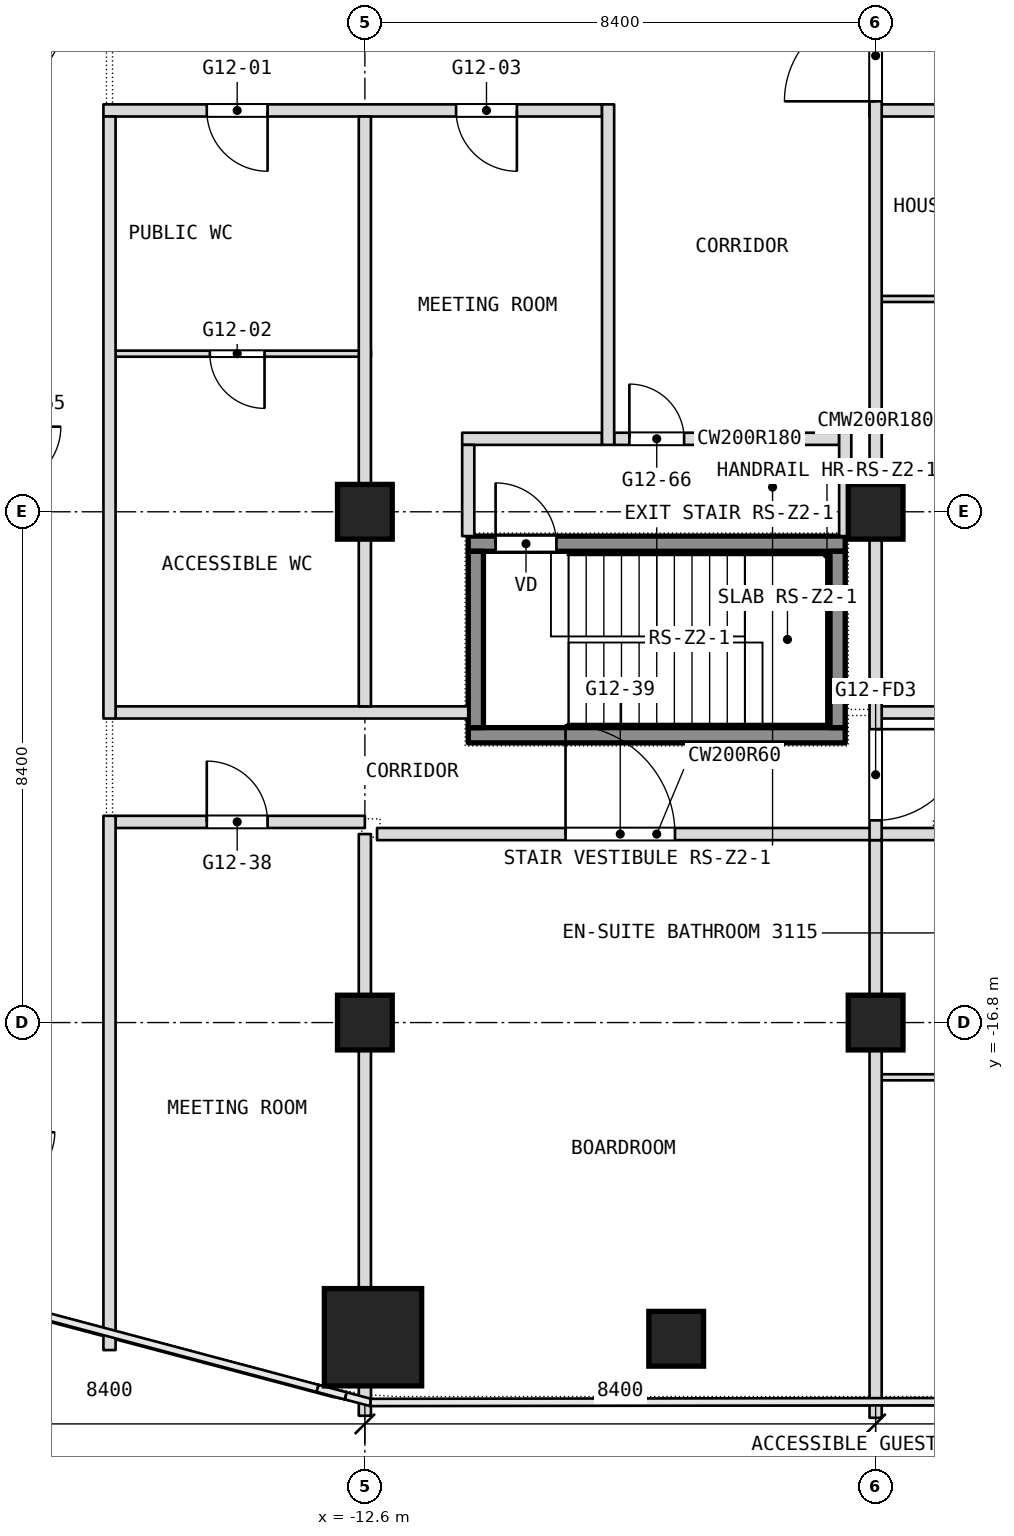
"""IFC4 building model, lengths in metres.
Left out: names, types, materials, properties, quantities, classifications, styles, units other than length and angle.
Written with IfcOpenShell. Run it as: python <this file> out.ifc"""

import sys

from ifc_helpers import new_model, si_unit, direction, frame, frame_2d, origin, origin_2d, place, context, subcontext, project, spatial, rectangle, extrude, element, fill, save


model = new_model("IFC4")
c1 = context("Model", 3, precision=1e-05, world=origin(), true_north=direction((0.0, 1.0)))
c2 = subcontext(c1, "Body", "Model", "MODEL_VIEW")
j1 = project(units=[si_unit("LENGTHUNIT", "METRE"), si_unit("PLANEANGLEUNIT", "RADIAN")], contexts=[c1])
p1 = place(None, origin())
s1 = spatial("IfcSite", under=j1, at=p1, CompositionType="ELEMENT")
p2 = place(p1, origin())
s2 = spatial("IfcBuilding", under=s1, at=p2, CompositionType="ELEMENT")
p3 = place(p2, frame((0.0, 0.0, 137.3)))
s3 = spatial("IfcBuildingStorey", under=s2, at=p3, CompositionType="ELEMENT", Elevation=137.3)
p4 = place(p3, frame((-12.466, -21.975, 0.0), z_axis=(0.0, 0.0, 1.0), x_axis=(1.0, 0.0, 0.0)))
e1 = element("IfcColumn", 1, at=p4, inside=s3, PredefinedType="COLUMN", context=c2, shape_type="SweptSolid", body=[
    extrude(rectangle(XDim=1.6, YDim=1.6, at=origin_2d()), origin(), (0.0, 0.0, 1.0), 3.6),
])
for number, where, z_axis, x_axis in (
    (2, (-12.6, -16.8, 0.0), (0.0, 0.0, 1.0), (1.0, 0.0, 0.0)),
    (3, (-12.6, -8.4, 0.0), (0.0, 0.0, 1.0), (1.0, 0.0, 0.0)),
    (4, (-4.2, -16.8, 0.0), (0.0, 0.0, 1.0), (1.0, 0.0, 0.0)),
    (5, (-4.2, -8.4, 0.0), (0.0, 0.0, 1.0), (1.0, 0.0, 0.0)),
    (6, (-7.48, -22.0, 0.0), (0.0, 0.0, 1.0), (1.0, 0.0, 0.0)),
):
    element("IfcColumn", number, at=place(p3, frame(where, z_axis=z_axis, x_axis=x_axis)), inside=s3, PredefinedType="COLUMN", context=c2, shape_type="SweptSolid", body=[
        extrude(rectangle(XDim=0.9, YDim=0.9, at=origin_2d()), origin(), (0.0, 0.0, 1.0), 3.6),
    ])
p5 = place(p3, frame((-4.1, -17.7, 0.0), z_axis=(0.0, 0.0, 1.0), x_axis=(1.0, 0.0, 0.0)))
e7 = element("IfcWall", 7, at=p5, inside=s3, PredefinedType="PARTITIONING", context=c2, shape_type="SweptSolid", body=[
    extrude(rectangle(XDim=2.35, YDim=0.1, at=frame_2d((1.175, 0.0))), origin(), (0.0, 0.0, 1.0), 3.34),
])
p6 = place(p5, frame((1.3, 0.0, 0.0)))
e8 = element("IfcOpeningElement", 8, at=p6, cuts=e7, PredefinedType="OPENING", context=c2, shape_type="SweptSolid", body=[
    extrude(rectangle(XDim=0.9, YDim=2.1, at=frame_2d((0.45, 1.05))), frame((0.0, 0.05, 0.0), z_axis=(0.0, -1.0, 0.0), x_axis=(1.0, 0.0, 0.0)), (0.0, 0.0, 1.0), 0.1),
])
p7 = place(p3, frame((-12.4, -13.7, 0.0), z_axis=(0.0, 0.0, 1.0), x_axis=(1.0, 0.0, 0.0)))
e9 = element("IfcWall", 9, at=p7, inside=s3, PredefinedType="PARTITIONING", context=c2, shape_type="SweptSolid", body=[
    extrude(rectangle(XDim=9.2, YDim=0.2, at=frame_2d((4.6, 0.0))), origin(), (0.0, 0.0, 1.0), 3.34),
])
p8 = place(p7, frame((3.1, 0.0, 0.0)))
e10 = element("IfcOpeningElement", 10, at=p8, cuts=e9, PredefinedType="OPENING", context=c2, shape_type="SweptSolid", body=[
    extrude(rectangle(XDim=1.8, YDim=2.1, at=frame_2d((0.9, 1.05))), frame((0.0, 0.1, 0.0), z_axis=(0.0, -1.0, 0.0), x_axis=(1.0, 0.0, 0.0)), (0.0, 0.0, 1.0), 0.2),
])
p9 = place(p3, frame((-16.7, -13.5, 0.0), z_axis=(0.0, 0.0, 1.0), x_axis=(1.0, 0.0, 0.0)))
e11 = element("IfcWall", 11, at=p9, inside=s3, PredefinedType="PARTITIONING", context=c2, shape_type="SweptSolid", body=[
    extrude(rectangle(XDim=4.1, YDim=0.2, at=frame_2d((2.05, 0.0))), origin(), (0.0, 0.0, 1.0), 3.34),
])
p10 = place(p9, frame((1.5, 0.0, 0.0)))
e12 = element("IfcOpeningElement", 12, at=p10, cuts=e11, PredefinedType="OPENING", context=c2, shape_type="SweptSolid", body=[
    extrude(rectangle(XDim=1.0, YDim=2.1, at=frame_2d((0.5, 1.05))), frame((0.0, 0.1, 0.0), z_axis=(0.0, -1.0, 0.0), x_axis=(1.0, 0.0, 0.0)), (0.0, 0.0, 1.0), 0.2),
])
p11 = place(p3, frame((-16.7, -11.7, 0.0), z_axis=(0.0, 0.0, 1.0), x_axis=(1.0, 0.0, 0.0)))
e13 = element("IfcWall", 13, at=p11, inside=s3, PredefinedType="PARTITIONING", context=c2, shape_type="SweptSolid", body=[
    extrude(rectangle(XDim=5.8, YDim=0.2, at=frame_2d((2.9, 0.0))), origin(), (0.0, 0.0, 1.0), 3.34),
])
p12 = place(p3, frame((-4.1, -11.7, 0.0), z_axis=(0.0, 0.0, 1.0), x_axis=(1.0, 0.0, 0.0)))
e14 = element("IfcWall", 14, at=p12, inside=s3, PredefinedType="PARTITIONING", context=c2, shape_type="SweptSolid", body=[
    extrude(rectangle(XDim=20.8, YDim=0.2, at=frame_2d((10.4, 0.0))), origin(), (0.0, 0.0, 1.0), 3.34),
])
p13 = place(p12, frame((14.1, 0.0, 0.0)))
e15 = element("IfcOpeningElement", 15, at=p13, cuts=e14, PredefinedType="OPENING", context=c2, shape_type="SweptSolid", body=[
    extrude(rectangle(XDim=1.0, YDim=2.1, at=frame_2d((0.5, 1.05))), frame((0.0, 0.1, 0.0), z_axis=(0.0, -1.0, 0.0), x_axis=(1.0, 0.0, 0.0)), (0.0, 0.0, 1.0), 0.2),
])
p14 = place(p12, frame((5.7, 0.0, 0.0)))
e16 = element("IfcOpeningElement", 16, at=p14, cuts=e14, PredefinedType="OPENING", context=c2, shape_type="SweptSolid", body=[
    extrude(rectangle(XDim=1.0, YDim=2.1, at=frame_2d((0.5, 1.05))), frame((0.0, 0.1, 0.0), z_axis=(0.0, -1.0, 0.0), x_axis=(1.0, 0.0, 0.0)), (0.0, 0.0, 1.0), 0.2),
])
p15 = place(p3, frame((-11.0, -7.2, 0.0), z_axis=(0.0, 0.0, 1.0), x_axis=(1.0, 0.0, 0.0)))
e17 = element("IfcWall", 17, at=p15, inside=s3, PredefinedType="PARTITIONING", context=c2, shape_type="SweptSolid", body=[
    extrude(rectangle(XDim=2.3, YDim=0.2, at=frame_2d((1.15, 0.0))), origin(), (0.0, 0.0, 1.0), 3.34),
])
p16 = place(p3, frame((-8.5, -7.2, 0.0), z_axis=(0.0, 0.0, 1.0), x_axis=(1.0, 0.0, 0.0)))
e18 = element("IfcWall", 18, at=p16, inside=s3, PredefinedType="PARTITIONING", context=c2, shape_type="SweptSolid", body=[
    extrude(rectangle(XDim=3.7, YDim=0.2, at=frame_2d((1.85, 0.0))), origin(), (0.0, 0.0, 1.0), 3.34),
])
p17 = place(p16, frame((0.25, 0.0, 0.0)))
e19 = element("IfcOpeningElement", 19, at=p17, cuts=e18, PredefinedType="OPENING", context=c2, shape_type="SweptSolid", body=[
    extrude(rectangle(XDim=0.9, YDim=2.1, at=frame_2d((0.45, 1.05))), frame((0.0, 0.1, 0.0), z_axis=(0.0, -1.0, 0.0), x_axis=(1.0, 0.0, 0.0)), (0.0, 0.0, 1.0), 0.2),
])
p18 = place(p3, frame((-16.7, -5.8, 0.0), z_axis=(0.0, 0.0, 1.0), x_axis=(1.0, 0.0, 0.0)))
e20 = element("IfcWall", 20, at=p18, inside=s3, PredefinedType="PARTITIONING", context=c2, shape_type="SweptSolid", body=[
    extrude(rectangle(XDim=4.2, YDim=0.1, at=frame_2d((2.1, 0.0))), origin(), (0.0, 0.0, 1.0), 3.34),
])
p19 = place(p18, frame((1.55, 0.0, 0.0)))
e21 = element("IfcOpeningElement", 21, at=p19, cuts=e20, PredefinedType="OPENING", context=c2, shape_type="SweptSolid", body=[
    extrude(rectangle(XDim=0.9, YDim=2.1, at=frame_2d((0.45, 1.05))), frame((0.0, 0.05, 0.0), z_axis=(0.0, -1.0, 0.0), x_axis=(1.0, 0.0, 0.0)), (0.0, 0.0, 1.0), 0.1),
])
p20 = place(p3, frame((-4.1, -4.9, 0.0), z_axis=(0.0, 0.0, 1.0), x_axis=(1.0, 0.0, 0.0)))
e22 = element("IfcWall", 22, at=p20, inside=s3, PredefinedType="PARTITIONING", context=c2, shape_type="SweptSolid", body=[
    extrude(rectangle(XDim=4.2, YDim=0.1, at=frame_2d((2.1, 0.0))), origin(), (0.0, 0.0, 1.0), 3.34),
])
p21 = place(p20, frame((1.55, 0.0, 0.0)))
e23 = element("IfcOpeningElement", 23, at=p21, cuts=e22, PredefinedType="OPENING", context=c2, shape_type="SweptSolid", body=[
    extrude(rectangle(XDim=0.9, YDim=2.1, at=frame_2d((0.45, 1.05))), frame((0.0, 0.05, 0.0), z_axis=(0.0, -1.0, 0.0), x_axis=(1.0, 0.0, 0.0)), (0.0, 0.0, 1.0), 0.1),
])
p22 = place(p3, frame((-16.9, -1.8, 0.0), z_axis=(0.0, 0.0, 1.0), x_axis=(1.0, 0.0, 0.0)))
e24 = element("IfcWall", 24, at=p22, inside=s3, PredefinedType="PARTITIONING", context=c2, shape_type="SweptSolid", body=[
    extrude(rectangle(XDim=8.2, YDim=0.2, at=frame_2d((4.1, 0.0))), origin(), (0.0, 0.0, 1.0), 3.34),
])
p23 = place(p22, frame((1.7, 0.0, 0.0)))
e25 = element("IfcOpeningElement", 25, at=p23, cuts=e24, PredefinedType="OPENING", context=c2, shape_type="SweptSolid", body=[
    extrude(rectangle(XDim=1.0, YDim=2.1, at=frame_2d((0.5, 1.05))), frame((0.0, 0.1, 0.0), z_axis=(0.0, -1.0, 0.0), x_axis=(1.0, 0.0, 0.0)), (0.0, 0.0, 1.0), 0.2),
])
p24 = place(p22, frame((5.8, 0.0, 0.0)))
e26 = element("IfcOpeningElement", 26, at=p24, cuts=e24, PredefinedType="OPENING", context=c2, shape_type="SweptSolid", body=[
    extrude(rectangle(XDim=1.0, YDim=2.1, at=frame_2d((0.5, 1.05))), frame((0.0, 0.1, 0.0), z_axis=(0.0, -1.0, 0.0), x_axis=(1.0, 0.0, 0.0)), (0.0, 0.0, 1.0), 0.2),
])
p25 = place(p3, frame((-4.3, -1.8, 0.0), z_axis=(0.0, 0.0, 1.0), x_axis=(1.0, 0.0, 0.0)))
e27 = element("IfcWall", 27, at=p25, inside=s3, PredefinedType="PARTITIONING", context=c2, shape_type="SweptSolid", body=[
    extrude(rectangle(XDim=11.3, YDim=0.2, at=frame_2d((5.65, 0.0))), origin(), (0.0, 0.0, 1.0), 3.34),
])
p26 = place(p25, frame((1.7, 0.0, 0.0)))
e28 = element("IfcOpeningElement", 28, at=p26, cuts=e27, PredefinedType="OPENING", context=c2, shape_type="SweptSolid", body=[
    extrude(rectangle(XDim=1.0, YDim=2.1, at=frame_2d((0.5, 1.05))), frame((0.0, 0.1, 0.0), z_axis=(0.0, -1.0, 0.0), x_axis=(1.0, 0.0, 0.0)), (0.0, 0.0, 1.0), 0.2),
])
p27 = place(p25, frame((10.1, 0.0, 0.0)))
e29 = element("IfcOpeningElement", 29, at=p27, cuts=e27, PredefinedType="OPENING", context=c2, shape_type="SweptSolid", body=[
    extrude(rectangle(XDim=1.0, YDim=2.1, at=frame_2d((0.5, 1.05))), frame((0.0, 0.1, 0.0), z_axis=(0.0, -1.0, 0.0), x_axis=(1.0, 0.0, 0.0)), (0.0, 0.0, 1.0), 0.2),
])
p28 = place(p25, frame((5.9, 0.0, 0.0)))
e30 = element("IfcOpeningElement", 30, at=p28, cuts=e27, PredefinedType="OPENING", context=c2, shape_type="SweptSolid", body=[
    extrude(rectangle(XDim=1.0, YDim=2.1, at=frame_2d((0.5, 1.05))), frame((0.0, 0.1, 0.0), z_axis=(0.0, -1.0, 0.0), x_axis=(1.0, 0.0, 0.0)), (0.0, 0.0, 1.0), 0.2),
])
p29 = place(p3, frame((-4.2, -23.3, 0.0), z_axis=(0.0, 0.0, 1.0), x_axis=(0.0, 1.0, 0.0)))
e31 = element("IfcWall", 31, at=p29, inside=s3, PredefinedType="PARTITIONING", context=c2, shape_type="SweptSolid", body=[
    extrude(rectangle(XDim=9.5, YDim=0.2, at=frame_2d((4.75, 0.0))), origin(), (0.0, 0.0, 1.0), 3.34),
])
p30 = place(p3, frame((-4.2, -13.8, 0.0), z_axis=(0.0, 0.0, 1.0), x_axis=(0.0, 1.0, 0.0)))
e32 = element("IfcWall", 32, at=p30, inside=s3, PredefinedType="PARTITIONING", context=c2, shape_type="SweptSolid", body=[
    extrude(rectangle(XDim=13.8, YDim=0.2, at=frame_2d((6.9, 0.0))), origin(), (0.0, 0.0, 1.0), 3.34),
])
p31 = place(p30, frame((12.15, 0.0, 0.0)))
e33 = element("IfcOpeningElement", 33, at=p31, cuts=e32, PredefinedType="OPENING", context=c2, shape_type="SweptSolid", body=[
    extrude(rectangle(XDim=1.5, YDim=2.1, at=frame_2d((0.75, 1.05))), frame((0.0, 0.1, 0.0), z_axis=(0.0, -1.0, 0.0), x_axis=(1.0, 0.0, 0.0)), (0.0, 0.0, 1.0), 0.2),
])
p32 = place(p30, frame((0.325, 0.0, 0.0)))
e34 = element("IfcOpeningElement", 34, at=p32, cuts=e32, PredefinedType="OPENING", context=c2, shape_type="SweptSolid", body=[
    extrude(rectangle(XDim=1.5, YDim=2.1, at=frame_2d((0.75, 1.05))), frame((0.0, 0.1, 0.0), z_axis=(0.0, -1.0, 0.0), x_axis=(1.0, 0.0, 0.0)), (0.0, 0.0, 1.0), 0.2),
])
p33 = place(p3, frame((-4.7, -8.8, 0.0), z_axis=(0.0, 0.0, 1.0), x_axis=(0.0, 1.0, 0.0)))
e35 = element("IfcWall", 35, at=p33, inside=s3, PredefinedType="PARTITIONING", context=c2, shape_type="SweptSolid", body=[
    extrude(rectangle(XDim=1.7, YDim=0.2, at=frame_2d((0.85, 0.0))), origin(), (0.0, 0.0, 1.0), 3.34),
])
p34 = place(p3, frame((-8.6, -7.3, 0.0), z_axis=(0.0, 0.0, 1.0), x_axis=(0.0, 1.0, 0.0)))
e36 = element("IfcWall", 36, at=p34, inside=s3, PredefinedType="PARTITIONING", context=c2, shape_type="SweptSolid", body=[
    extrude(rectangle(XDim=5.6, YDim=0.2, at=frame_2d((2.8, 0.0))), origin(), (0.0, 0.0, 1.0), 3.34),
])
p35 = place(p3, frame((-10.9, -8.8, 0.0), z_axis=(0.0, 0.0, 1.0), x_axis=(0.0, 1.0, 0.0)))
e37 = element("IfcWall", 37, at=p35, inside=s3, PredefinedType="PARTITIONING", context=c2, shape_type="SweptSolid", body=[
    extrude(rectangle(XDim=1.5, YDim=0.2, at=frame_2d((0.75, 0.0))), origin(), (0.0, 0.0, 1.0), 3.34),
])
p36 = place(p3, frame((-12.6, -23.266, 0.0), z_axis=(0.0, 0.0, 1.0), x_axis=(0.0, 1.0, 0.0)))
e38 = element("IfcWall", 38, at=p36, inside=s3, PredefinedType="PARTITIONING", context=c2, shape_type="SweptSolid", body=[
    extrude(rectangle(XDim=0.491, YDim=0.2, at=frame_2d((0.246, 0.0))), origin(), (0.0, 0.0, 1.0), 3.34),
])
p37 = place(p3, frame((-12.6, -21.175, 0.0), z_axis=(0.0, 0.0, 1.0), x_axis=(0.0, 1.0, 0.0)))
e39 = element("IfcWall", 39, at=p37, inside=s3, PredefinedType="PARTITIONING", context=c2, shape_type="SweptSolid", body=[
    extrude(rectangle(XDim=7.475, YDim=0.2, at=frame_2d((3.738, 0.0))), origin(), (0.0, 0.0, 1.0), 3.34),
])
p38 = place(p3, frame((-12.6, -11.6, 0.0), z_axis=(0.0, 0.0, 1.0), x_axis=(0.0, 1.0, 0.0)))
e40 = element("IfcWall", 40, at=p38, inside=s3, PredefinedType="PARTITIONING", context=c2, shape_type="SweptSolid", body=[
    extrude(rectangle(XDim=9.7, YDim=0.2, at=frame_2d((4.85, 0.0))), origin(), (0.0, 0.0, 1.0), 3.34),
])
p39 = place(p3, frame((-16.8, -22.186, 0.0), z_axis=(0.0, 0.0, 1.0), x_axis=(0.0, 1.0, 0.0)))
e41 = element("IfcWall", 41, at=p39, inside=s3, PredefinedType="PARTITIONING", context=c2, shape_type="SweptSolid", body=[
    extrude(rectangle(XDim=8.786, YDim=0.2, at=frame_2d((4.393, 0.0))), origin(), (0.0, 0.0, 1.0), 3.34),
])
p40 = place(p3, frame((-16.8, -11.8, 0.0), z_axis=(0.0, 0.0, 1.0), x_axis=(0.0, 1.0, 0.0)))
e42 = element("IfcWall", 42, at=p40, inside=s3, PredefinedType="PARTITIONING", context=c2, shape_type="SweptSolid", body=[
    extrude(rectangle(XDim=9.9, YDim=0.2, at=frame_2d((4.95, 0.0))), origin(), (0.0, 0.0, 1.0), 3.34),
])
p41 = place(p3, frame((-10.9, -12.075, 0.1), z_axis=(0.0, 0.0, 1.0), x_axis=(1.0, 0.0, 0.0)))
e43 = element("IfcWall", 43, at=p41, inside=s3, PredefinedType="SHEAR", context=c2, shape_type="SweptSolid", body=[
    extrude(rectangle(XDim=6.2, YDim=0.25, at=frame_2d((3.1, 0.0))), origin(), (0.0, 0.0, 1.0), 3.6),
])
p42 = place(p3, frame((-10.9, -8.925, 0.1), z_axis=(0.0, 0.0, 1.0), x_axis=(1.0, 0.0, 0.0)))
e44 = element("IfcWall", 44, at=p42, inside=s3, PredefinedType="SHEAR", context=c2, shape_type="SweptSolid", body=[
    extrude(rectangle(XDim=6.2, YDim=0.25, at=frame_2d((3.1, 0.0))), origin(), (0.0, 0.0, 1.0), 3.6),
])
p43 = place(p42, frame((0.45, 0.0, 0.0)))
e45 = element("IfcOpeningElement", 45, at=p43, cuts=e44, PredefinedType="OPENING", context=c2, shape_type="SweptSolid", body=[
    extrude(rectangle(XDim=1.0, YDim=2.1, at=frame_2d((0.5, 1.05))), frame((0.0, 0.125, 0.0), z_axis=(0.0, -1.0, 0.0), x_axis=(1.0, 0.0, 0.0)), (0.0, 0.0, 1.0), 0.25),
])
for number, where, z_axis, x_axis in (
    (46, (-10.775, -11.95, 0.1), (0.0, 0.0, 1.0), (0.0, 1.0, 0.0)),
    (47, (-4.825, -11.95, 0.1), (0.0, 0.0, 1.0), (0.0, 1.0, 0.0)),
):
    element("IfcWall", number, at=place(p3, frame(where, z_axis=z_axis, x_axis=x_axis)), inside=s3, PredefinedType="SHEAR", context=c2, shape_type="SweptSolid", body=[
        extrude(rectangle(XDim=2.9, YDim=0.25, at=frame_2d((1.45, 0.0))), origin(), (0.0, 0.0, 1.0), 3.6),
    ])
p44 = place(p8, origin())
e48 = element("IfcDoor", 48, at=p44, inside=s3, OperationType="DOUBLE_DOOR_SINGLE_SWING", PredefinedType="DOOR", context=c2, shape_type="SweptSolid", body=[
    extrude(rectangle(XDim=1.8, YDim=2.1, at=frame_2d((0.9, 1.05))), frame((0.0, 0.025, 0.0), z_axis=(0.0, -1.0, 0.0), x_axis=(1.0, 0.0, 0.0)), (0.0, 0.0, 1.0), 0.05),
])
fill(e10, e48)
p45 = place(p10, origin())
e49 = element("IfcDoor", 49, at=p45, inside=s3, OperationType="SINGLE_SWING_LEFT", PredefinedType="DOOR", context=c2, shape_type="SweptSolid", body=[
    extrude(rectangle(XDim=1.0, YDim=2.1, at=frame_2d((0.5, 1.05))), frame((0.0, 0.025, 0.0), z_axis=(0.0, -1.0, 0.0), x_axis=(1.0, 0.0, 0.0)), (0.0, 0.0, 1.0), 0.05),
])
fill(e12, e49)
p46 = place(p17, origin())
e50 = element("IfcDoor", 50, at=p46, inside=s3, OperationType="SINGLE_SWING_RIGHT", PredefinedType="DOOR", context=c2, shape_type="SweptSolid", body=[
    extrude(rectangle(XDim=0.9, YDim=2.1, at=frame_2d((0.45, 1.05))), frame((0.0, 0.025, 0.0), z_axis=(0.0, -1.0, 0.0), x_axis=(1.0, 0.0, 0.0)), (0.0, 0.0, 1.0), 0.05),
])
fill(e19, e50)
p47 = place(p19, origin())
e51 = element("IfcDoor", 51, at=p47, inside=s3, OperationType="SINGLE_SWING_RIGHT", PredefinedType="DOOR", context=c2, shape_type="SweptSolid", body=[
    extrude(rectangle(XDim=0.9, YDim=2.1, at=frame_2d((0.45, 1.05))), frame((0.0, 0.025, 0.0), z_axis=(0.0, -1.0, 0.0), x_axis=(1.0, 0.0, 0.0)), (0.0, 0.0, 1.0), 0.05),
])
fill(e21, e51)
p48 = place(p23, origin())
e52 = element("IfcDoor", 52, at=p48, inside=s3, OperationType="SINGLE_SWING_LEFT", PredefinedType="DOOR", context=c2, shape_type="SweptSolid", body=[
    extrude(rectangle(XDim=1.0, YDim=2.1, at=frame_2d((0.5, 1.05))), frame((0.0, 0.025, 0.0), z_axis=(0.0, -1.0, 0.0), x_axis=(1.0, 0.0, 0.0)), (0.0, 0.0, 1.0), 0.05),
])
fill(e25, e52)
p49 = place(p24, origin())
e53 = element("IfcDoor", 53, at=p49, inside=s3, OperationType="SINGLE_SWING_LEFT", PredefinedType="DOOR", context=c2, shape_type="SweptSolid", body=[
    extrude(rectangle(XDim=1.0, YDim=2.1, at=frame_2d((0.5, 1.05))), frame((0.0, 0.025, 0.0), z_axis=(0.0, -1.0, 0.0), x_axis=(1.0, 0.0, 0.0)), (0.0, 0.0, 1.0), 0.05),
])
fill(e26, e53)
p50 = place(p43, origin())
e54 = element("IfcDoor", 54, at=p50, inside=s3, OperationType="SINGLE_SWING_LEFT", PredefinedType="DOOR", context=c2, shape_type="SweptSolid", body=[
    extrude(rectangle(XDim=1.0, YDim=2.1, at=frame_2d((0.5, 1.05))), frame((0.0, 0.025, 0.0), z_axis=(0.0, -1.0, 0.0), x_axis=(1.0, 0.0, 0.0)), (0.0, 0.0, 1.0), 0.05),
])
fill(e45, e54)
p51 = place(p31, origin())
e55 = element("IfcDoor", 55, at=p51, inside=s3, OperationType="DOUBLE_DOOR_DOUBLE_SWING", PredefinedType="DOOR", context=c2, shape_type="SweptSolid", body=[
    extrude(rectangle(XDim=1.5, YDim=2.1, at=frame_2d((0.75, 1.05))), frame((0.0, 0.025, 0.0), z_axis=(0.0, -1.0, 0.0), x_axis=(1.0, 0.0, 0.0)), (0.0, 0.0, 1.0), 0.05),
])
fill(e33, e55)
p52 = place(p32, origin())
e56 = element("IfcDoor", 56, at=p52, inside=s3, OperationType="DOUBLE_DOOR_DOUBLE_SWING", PredefinedType="DOOR", context=c2, shape_type="SweptSolid", body=[
    extrude(rectangle(XDim=1.5, YDim=2.1, at=frame_2d((0.75, 1.05))), frame((0.0, 0.025, 0.0), z_axis=(0.0, -1.0, 0.0), x_axis=(1.0, 0.0, 0.0)), (0.0, 0.0, 1.0), 0.05),
])
fill(e34, e56)
save(model, sys.argv[1])
